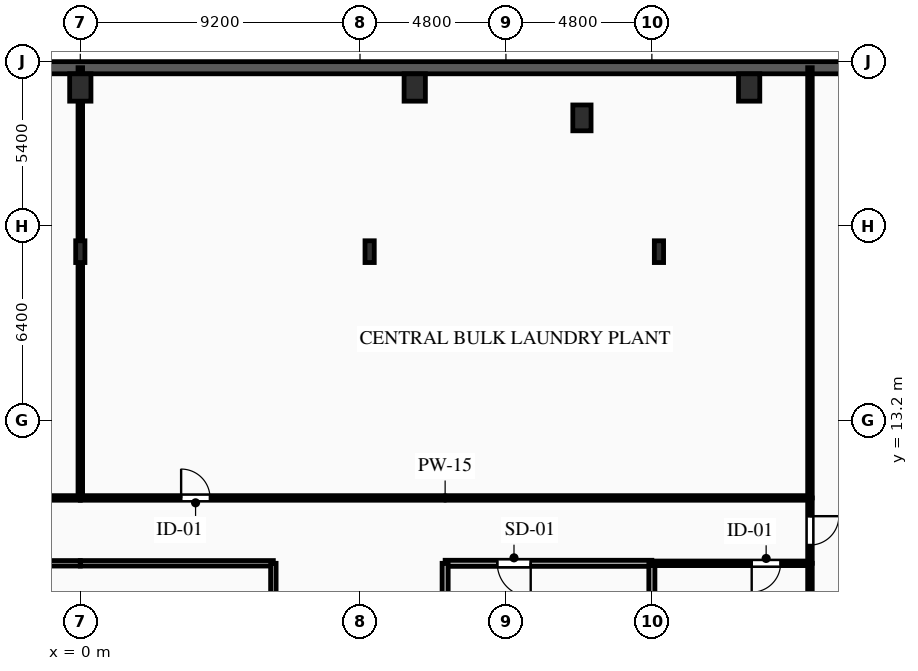
"""IFC4 building model, lengths in metres.
Left out: names, types, materials, properties, quantities, classifications, styles, units other than length and angle.
Written with IfcOpenShell. Run it as: python <this file> out.ifc"""

import sys

from ifc_helpers import new_model, si_unit, direction, frame, frame_2d, origin, origin_2d, place, context, subcontext, project, spatial, rectangle, i_section, extrude, element, fill, save


model = new_model("IFC4")
c1 = context("Model", 3, precision=1e-05, world=origin(), true_north=direction((0.0, 1.0)))
c2 = subcontext(c1, "Body", "Model", "MODEL_VIEW")
j1 = project(units=[si_unit("LENGTHUNIT", "METRE"), si_unit("PLANEANGLEUNIT", "RADIAN")], contexts=[c1])
p1 = place(None, origin())
s1 = spatial("IfcSite", under=j1, at=p1, CompositionType="ELEMENT")
p2 = place(p1, origin())
s2 = spatial("IfcBuilding", under=s1, at=p2, CompositionType="ELEMENT")
p3 = place(p2, frame((0.0, 0.0, -4.5)))
s3 = spatial("IfcBuildingStorey", under=s2, at=p3, CompositionType="ELEMENT", Elevation=-4.5)
for number, where, z_axis, x_axis in (
    (1, (0.0, 24.15, 0.0), (0.0, 0.0, 1.0), (1.0, 0.0, 0.0)),
    (2, (11.0, 24.15, 0.0), (0.0, 0.0, 1.0), (1.0, 0.0, 0.0)),
    (3, (22.0, 24.15, 0.0), (0.0, 0.0, 1.0), (1.0, 0.0, 0.0)),
):
    element("IfcColumn", number, at=place(p3, frame(where, z_axis=z_axis, x_axis=x_axis)), inside=s3, PredefinedType="COLUMN", context=c2, shape_type="SweptSolid", body=[
        extrude(rectangle(XDim=0.7, YDim=0.9, at=origin_2d()), origin(), (0.0, 0.0, 1.0), 4.5),
    ])
p4 = place(p3, frame((16.5, 23.15, 0.0), z_axis=(0.0, 0.0, 1.0), x_axis=(1.0, 0.0, 0.0)))
e4 = element("IfcColumn", 4, at=p4, inside=s3, PredefinedType="PILASTER", context=c2, shape_type="SweptSolid", body=[
    extrude(rectangle(XDim=0.6, YDim=0.85, at=origin_2d()), origin(), (0.0, 0.0, 1.0), 4.5),
])
for number, where, z_axis, x_axis in (
    (5, (19.033, 18.75, 0.0), (0.0, 0.0, 1.0), (1.0, 0.0, 0.0)),
    (6, (9.517, 18.75, 0.0), (0.0, 0.0, 1.0), (1.0, 0.0, 0.0)),
    (7, (0.0, 18.75, 0.0), (0.0, 0.0, 1.0), (1.0, 0.0, 0.0)),
):
    element("IfcColumn", number, at=place(p3, frame(where, z_axis=z_axis, x_axis=x_axis)), inside=s3, PredefinedType="COLUMN", context=c2, shape_type="SweptSolid", body=[
        extrude(i_section(OverallWidth=0.304, OverallDepth=0.716, WebThickness=0.021, FlangeThickness=0.04, FilletRadius=0.027, at=origin_2d()), origin(), (0.0, 0.0, 1.0), 4.5),
    ])
p5 = place(p3, frame((-38.3, 24.8, 0.0), z_axis=(0.0, 0.0, 1.0), x_axis=(1.0, 0.0, 0.0)))
e8 = element("IfcWall", 8, at=p5, inside=s3, PredefinedType="SOLIDWALL", context=c2, shape_type="SweptSolid", body=[
    extrude(rectangle(XDim=76.6, YDim=0.4, at=frame_2d((38.3, 0.0))), origin(), (0.0, 0.0, 1.0), 4.16),
])
p6 = place(p3, frame((18.8, 8.5, 0.0), z_axis=(0.0, 0.0, 1.0), x_axis=(-1.0, 0.0, 0.0)))
e9 = element("IfcWall", 9, at=p6, inside=s3, PredefinedType="PARTITIONING", context=c2, shape_type="SweptSolid", body=[
    extrude(rectangle(XDim=6.8, YDim=0.2, at=frame_2d((3.4, 0.0))), origin(), (0.0, 0.0, 1.0), 4.16),
])
p7 = place(p6, frame((3.985, 0.0, 0.0)))
e10 = element("IfcOpeningElement", 10, at=p7, cuts=e9, PredefinedType="OPENING", context=c2, shape_type="SweptSolid", body=[
    extrude(rectangle(XDim=1.1, YDim=2.15, at=frame_2d((0.55, 1.075))), frame((0.0, 0.11, 0.0), z_axis=(0.0, -1.0, 0.0), x_axis=(1.0, 0.0, 0.0)), (0.0, 0.0, 1.0), 0.22),
])
p8 = place(p3, frame((12.0, 8.5, 0.0), z_axis=(0.0, 0.0, 1.0), x_axis=(0.0, -1.0, 0.0)))
e11 = element("IfcWall", 11, at=p8, inside=s3, PredefinedType="PARTITIONING", context=c2, shape_type="SweptSolid", body=[
    extrude(rectangle(XDim=2.9, YDim=0.2, at=frame_2d((1.45, 0.0))), origin(), (0.0, 0.0, 1.0), 4.16),
])
p9 = place(p3, frame((18.8, 5.6, 0.0), z_axis=(0.0, 0.0, 1.0), x_axis=(0.0, 1.0, 0.0)))
e12 = element("IfcWall", 12, at=p9, inside=s3, PredefinedType="PARTITIONING", context=c2, shape_type="SweptSolid", body=[
    extrude(rectangle(XDim=2.9, YDim=0.2, at=frame_2d((1.45, 0.0))), origin(), (0.0, 0.0, 1.0), 3.645),
])
p10 = place(p3, frame((-24.0, 10.65, 0.0), z_axis=(0.0, 0.0, 1.0), x_axis=(1.0, 0.0, 0.0)))
e13 = element("IfcWall", 13, at=p10, inside=s3, PredefinedType="PARTITIONING", context=c2, shape_type="SweptSolid", body=[
    extrude(rectangle(XDim=24.0, YDim=0.15, at=frame_2d((12.0, 0.0))), origin(), (0.0, 0.0, 1.0), 4.16),
])
p11 = place(p10, frame((19.734, 0.0, 0.0)))
e14 = element("IfcOpeningElement", 14, at=p11, cuts=e13, PredefinedType="OPENING", context=c2, shape_type="SweptSolid", body=[
    extrude(rectangle(XDim=0.95, YDim=2.1, at=frame_2d((0.475, 1.05))), frame((0.0, 0.085, 0.0), z_axis=(0.0, -1.0, 0.0), x_axis=(1.0, 0.0, 0.0)), (0.0, 0.0, 1.0), 0.17),
])
p12 = place(p3, frame((0.0, 8.5, 0.0), z_axis=(0.0, 0.0, 1.0), x_axis=(-1.0, 0.0, 0.0)))
e15 = element("IfcWall", 15, at=p12, inside=s3, PredefinedType="PARTITIONING", context=c2, shape_type="SweptSolid", body=[
    extrude(rectangle(XDim=6.35, YDim=0.18, at=frame_2d((3.175, 0.0))), origin(), (0.0, 0.0, 1.0), 4.16),
])
p13 = place(p3, frame((0.0, 10.65, 0.0), z_axis=(0.0, 0.0, 1.0), x_axis=(1.0, 0.0, 0.0)))
e16 = element("IfcWall", 16, at=p13, inside=s3, PredefinedType="PARTITIONING", context=c2, shape_type="SweptSolid", body=[
    extrude(rectangle(XDim=24.0, YDim=0.15, at=frame_2d((12.0, 0.0))), origin(), (0.0, 0.0, 1.0), 4.16),
])
p14 = place(p13, frame((3.316, 0.0, 0.0)))
e17 = element("IfcOpeningElement", 17, at=p14, cuts=e16, PredefinedType="OPENING", context=c2, shape_type="SweptSolid", body=[
    extrude(rectangle(XDim=0.95, YDim=2.1, at=frame_2d((0.475, 1.05))), frame((0.0, 0.085, 0.0), z_axis=(0.0, -1.0, 0.0), x_axis=(1.0, 0.0, 0.0)), (0.0, 0.0, 1.0), 0.17),
])
p15 = place(p3, frame((24.0, 8.5, 0.0), z_axis=(0.0, 0.0, 1.0), x_axis=(-1.0, 0.0, 0.0)))
e18 = element("IfcWall", 18, at=p15, inside=s3, PredefinedType="PARTITIONING", context=c2, shape_type="SweptSolid", body=[
    extrude(rectangle(XDim=5.2, YDim=0.15, at=frame_2d((2.6, 0.0))), origin(), (0.0, 0.0, 1.0), 4.16),
])
p16 = place(p15, frame((0.966, 0.0, 0.0)))
e19 = element("IfcOpeningElement", 19, at=p16, cuts=e18, PredefinedType="OPENING", context=c2, shape_type="SweptSolid", body=[
    extrude(rectangle(XDim=0.95, YDim=2.1, at=frame_2d((0.475, 1.05))), frame((0.0, 0.085, 0.0), z_axis=(0.0, -1.0, 0.0), x_axis=(1.0, 0.0, 0.0)), (0.0, 0.0, 1.0), 0.17),
])
p17 = place(p3, frame((6.35, 8.5, 0.0), z_axis=(0.0, 0.0, 1.0), x_axis=(-1.0, 0.0, 0.0)))
e20 = element("IfcWall", 20, at=p17, inside=s3, PredefinedType="PARTITIONING", context=c2, shape_type="SweptSolid", body=[
    extrude(rectangle(XDim=6.35, YDim=0.18, at=frame_2d((3.175, 0.0))), origin(), (0.0, 0.0, 1.0), 4.16),
])
p18 = place(p3, frame((24.0, 10.65, 0.0), z_axis=(0.0, 0.0, 1.0), x_axis=(0.0, -1.0, 0.0)))
e21 = element("IfcWall", 21, at=p18, inside=s3, PredefinedType="PARTITIONING", context=c2, shape_type="SweptSolid", body=[
    extrude(rectangle(XDim=2.15, YDim=0.15, at=frame_2d((1.075, 0.0))), origin(), (0.0, 0.0, 1.0), 4.16),
])
p19 = place(p18, frame((0.6, 0.0, 0.0)))
e22 = element("IfcOpeningElement", 22, at=p19, cuts=e21, PredefinedType="OPENING", context=c2, shape_type="SweptSolid", body=[
    extrude(rectangle(XDim=0.95, YDim=2.1, at=frame_2d((0.475, 1.05))), frame((0.0, 0.085, 0.0), z_axis=(0.0, -1.0, 0.0), x_axis=(1.0, 0.0, 0.0)), (0.0, 0.0, 1.0), 0.17),
])
p20 = place(p3, frame((6.35, -5.6, 0.0), z_axis=(0.0, 0.0, 1.0), x_axis=(0.0, 1.0, 0.0)))
e23 = element("IfcWall", 23, at=p20, inside=s3, PredefinedType="PARTITIONING", context=c2, shape_type="SweptSolid", body=[
    extrude(rectangle(XDim=14.1, YDim=0.18, at=frame_2d((7.05, 0.0))), origin(), (0.0, 0.0, 1.0), 4.16),
])
p21 = place(p3, frame((0.0, 24.8, 0.0), z_axis=(0.0, 0.0, 1.0), x_axis=(0.0, -1.0, 0.0)))
e24 = element("IfcWall", 24, at=p21, inside=s3, PredefinedType="PARTITIONING", context=c2, shape_type="SweptSolid", body=[
    extrude(rectangle(XDim=14.15, YDim=0.15, at=frame_2d((7.075, 0.0))), origin(), (0.0, 0.0, 1.0), 3.545),
])
p22 = place(p3, frame((24.0, 24.8, 0.0), z_axis=(0.0, 0.0, 1.0), x_axis=(0.0, -1.0, 0.0)))
e25 = element("IfcWall", 25, at=p22, inside=s3, PredefinedType="PARTITIONING", context=c2, shape_type="SweptSolid", body=[
    extrude(rectangle(XDim=14.15, YDim=0.15, at=frame_2d((7.075, 0.0))), origin(), (0.0, 0.0, 1.0), 4.16),
])
p23 = place(p3, frame((24.0, 8.5, 0.0), z_axis=(0.0, 0.0, 1.0), x_axis=(0.0, -1.0, 0.0)))
e26 = element("IfcWall", 26, at=p23, inside=s3, PredefinedType="PARTITIONING", context=c2, shape_type="SweptSolid", body=[
    extrude(rectangle(XDim=14.1, YDim=0.15, at=frame_2d((7.05, 0.0))), origin(), (0.0, 0.0, 1.0), 4.16),
])
p24 = place(p7, origin())
e27 = element("IfcDoor", 27, at=p24, inside=s3, OperationType="SINGLE_SWING_LEFT", PredefinedType="DOOR", context=c2, shape_type="SweptSolid", body=[
    extrude(rectangle(XDim=1.1, YDim=2.15, at=frame_2d((0.55, 1.075))), frame((0.0, 0.025, 0.0), z_axis=(0.0, -1.0, 0.0), x_axis=(1.0, 0.0, 0.0)), (0.0, 0.0, 1.0), 0.05),
])
fill(e10, e27)
p25 = place(p14, origin())
e28 = element("IfcDoor", 28, at=p25, inside=s3, OperationType="SINGLE_SWING_LEFT", PredefinedType="DOOR", context=c2, shape_type="SweptSolid", body=[
    extrude(rectangle(XDim=0.95, YDim=2.1, at=frame_2d((0.475, 1.05))), frame((0.0, 0.025, 0.0), z_axis=(0.0, -1.0, 0.0), x_axis=(1.0, 0.0, 0.0)), (0.0, 0.0, 1.0), 0.05),
])
fill(e17, e28)
p26 = place(p16, origin())
e29 = element("IfcDoor", 29, at=p26, inside=s3, OperationType="SINGLE_SWING_RIGHT", PredefinedType="DOOR", context=c2, shape_type="SweptSolid", body=[
    extrude(rectangle(XDim=0.95, YDim=2.1, at=frame_2d((0.475, 1.05))), frame((0.0, 0.025, 0.0), z_axis=(0.0, -1.0, 0.0), x_axis=(1.0, 0.0, 0.0)), (0.0, 0.0, 1.0), 0.05),
])
fill(e19, e29)
p27 = place(p19, origin())
e30 = element("IfcDoor", 30, at=p27, inside=s3, OperationType="SINGLE_SWING_LEFT", PredefinedType="DOOR", context=c2, shape_type="SweptSolid", body=[
    extrude(rectangle(XDim=0.95, YDim=2.1, at=frame_2d((0.475, 1.05))), frame((0.0, 0.025, 0.0), z_axis=(0.0, -1.0, 0.0), x_axis=(1.0, 0.0, 0.0)), (0.0, 0.0, 1.0), 0.05),
])
fill(e22, e30)
save(model, sys.argv[1])
